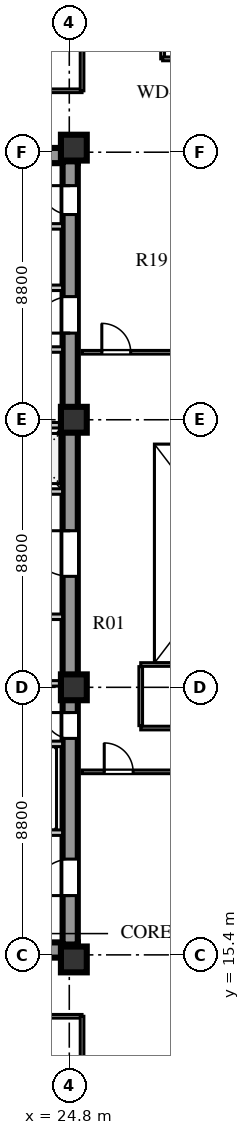
"""IFC4 building model, lengths in metres.
Left out: names, types, materials, properties, quantities, classifications, styles, units other than length and angle.
Written with IfcOpenShell. Run it as: python <this file> out.ifc"""

import sys

from ifc_helpers import new_model, si_unit, direction, frame, frame_2d, origin, origin_2d, place, context, subcontext, project, spatial, rectangle, extrude, element, fill, save


model = new_model("IFC4")
c1 = context("Model", 3, precision=1e-05, world=origin(), true_north=direction((0.0, 1.0)))
c2 = subcontext(c1, "Body", "Model", "MODEL_VIEW")
j1 = project(units=[si_unit("LENGTHUNIT", "METRE"), si_unit("PLANEANGLEUNIT", "RADIAN")], contexts=[c1])
p1 = place(None, origin())
s1 = spatial("IfcSite", under=j1, at=p1, CompositionType="ELEMENT")
p2 = place(p1, origin())
s2 = spatial("IfcBuilding", under=s1, at=p2, CompositionType="ELEMENT")
p3 = place(p2, frame((0.0, 0.0, 111.7)))
s3 = spatial("IfcBuildingStorey", under=s2, at=p3, CompositionType="ELEMENT", Elevation=111.7)
for number, where, z_axis, x_axis in (
    (1, (15.4, 15.56, 0.0), (0.0, 0.0, 1.0), (1.0, 0.0, 0.0)),
    (2, (15.4, 41.69, 0.0), (0.0, 0.0, 1.0), (1.0, 0.0, 0.0)),
):
    element("IfcWall", number, at=place(p3, frame(where, z_axis=z_axis, x_axis=x_axis)), inside=s3, PredefinedType="SHEAR", context=c2, shape_type="SweptSolid", body=[
        extrude(rectangle(XDim=9.68, YDim=0.5, at=frame_2d((4.84, 0.0))), origin(), (0.0, 0.0, 1.0), 3.6),
    ])
p4 = place(p3, frame((24.83, 15.74, 0.0), z_axis=(0.0, 0.0, 1.0), x_axis=(0.0, 1.0, 0.0)))
e3 = element("IfcWall", 3, at=p4, inside=s3, PredefinedType="SHEAR", context=c2, shape_type="SweptSolid", body=[
    extrude(rectangle(XDim=25.76, YDim=0.5, at=frame_2d((12.88, 0.0))), origin(), (0.0, 0.0, 1.0), 3.6),
])
p5 = place(p4, frame((1.61, 0.0, 0.0)))
e4 = element("IfcOpeningElement", 4, at=p5, cuts=e3, PredefinedType="OPENING", context=c2, shape_type="SweptSolid", body=[
    extrude(rectangle(XDim=1.2, YDim=2.1, at=frame_2d((0.6, 1.05))), frame((0.0, 0.26, 0.0), z_axis=(0.0, -1.0, 0.0), x_axis=(1.0, 0.0, 0.0)), (0.0, 0.0, 1.0), 0.52),
])
p6 = place(p4, frame((6.78, 0.0, 0.0)))
e5 = element("IfcOpeningElement", 5, at=p6, cuts=e3, PredefinedType="OPENING", context=c2, shape_type="SweptSolid", body=[
    extrude(rectangle(XDim=0.85, YDim=2.06, at=frame_2d((0.425, 1.03))), frame((0.0, 0.26, 0.0), z_axis=(0.0, -1.0, 0.0), x_axis=(1.0, 0.0, 0.0)), (0.0, 0.0, 1.0), 0.52),
])
p7 = place(p4, frame((12.11, 0.0, 0.0)))
e6 = element("IfcOpeningElement", 6, at=p7, cuts=e3, PredefinedType="OPENING", context=c2, shape_type="SweptSolid", body=[
    extrude(rectangle(XDim=1.5, YDim=2.12, at=frame_2d((0.75, 1.06))), frame((0.0, 0.26, 0.0), z_axis=(0.0, -1.0, 0.0), x_axis=(1.0, 0.0, 0.0)), (0.0, 0.0, 1.0), 0.52),
])
p8 = place(p4, frame((20.11, 0.0, 0.0)))
e7 = element("IfcOpeningElement", 7, at=p8, cuts=e3, PredefinedType="OPENING", context=c2, shape_type="SweptSolid", body=[
    extrude(rectangle(XDim=1.2, YDim=2.12, at=frame_2d((0.6, 1.06))), frame((0.0, 0.26, 0.0), z_axis=(0.0, -1.0, 0.0), x_axis=(1.0, 0.0, 0.0)), (0.0, 0.0, 1.0), 0.52),
])
p9 = place(p4, frame((24.01, 0.0, 0.0)))
e8 = element("IfcOpeningElement", 8, at=p9, cuts=e3, PredefinedType="OPENING", context=c2, shape_type="SweptSolid", body=[
    extrude(rectangle(XDim=0.95, YDim=2.1, at=frame_2d((0.475, 1.05))), frame((0.0, 0.26, 0.0), z_axis=(0.0, -1.0, 0.0), x_axis=(1.0, 0.0, 0.0)), (0.0, 0.0, 1.0), 0.52),
])
for number, where, z_axis, x_axis in (
    (9, (24.95, 15.25, 0.0), (0.0, 0.0, 1.0), (1.0, 0.0, 0.0)),
    (10, (24.95, 24.2, 0.0), (0.0, 0.0, 1.0), (1.0, 0.0, 0.0)),
    (11, (24.95, 33.0, 0.0), (0.0, 0.0, 1.0), (1.0, 0.0, 0.0)),
    (12, (24.95, 41.95, 0.0), (0.0, 0.0, 1.0), (1.0, 0.0, 0.0)),
):
    element("IfcColumn", number, at=place(p3, frame(where, z_axis=z_axis, x_axis=x_axis)), inside=s3, PredefinedType="COLUMN", context=c2, shape_type="SweptSolid", body=[
        extrude(rectangle(XDim=0.85, YDim=0.85, at=origin_2d()), origin(), (0.0, 0.0, 1.0), 3.6),
    ])
p10 = place(p3, frame((19.64, 19.42, 0.0), z_axis=(0.0, 0.0, 1.0), x_axis=(1.0, 0.0, 0.0)))
e13 = element("IfcWall", 13, at=p10, inside=s3, PredefinedType="SOLIDWALL", context=c2, shape_type="SweptSolid", body=[
    extrude(rectangle(XDim=4.94, YDim=0.18, at=frame_2d((2.47, 0.0))), origin(), (0.0, 0.0, 1.0), 3.6),
])
p11 = place(p10, frame((0.72, 0.0, 0.0)))
e14 = element("IfcOpeningElement", 14, at=p11, cuts=e13, PredefinedType="OPENING", context=c2, shape_type="SweptSolid", body=[
    extrude(rectangle(XDim=1.1, YDim=2.1, at=frame_2d((0.55, 1.05))), frame((0.0, 0.1, 0.0), z_axis=(0.0, -1.0, 0.0), x_axis=(1.0, 0.0, 0.0)), (0.0, 0.0, 1.0), 0.2),
])
p12 = place(p10, frame((3.02, 0.0, 0.0)))
e15 = element("IfcOpeningElement", 15, at=p12, cuts=e13, PredefinedType="OPENING", context=c2, shape_type="SweptSolid", body=[
    extrude(rectangle(XDim=1.1, YDim=2.1, at=frame_2d((0.55, 1.05))), frame((0.0, 0.1, 0.0), z_axis=(0.0, -1.0, 0.0), x_axis=(1.0, 0.0, 0.0)), (0.0, 0.0, 1.0), 0.2),
])
p13 = place(p3, frame((19.64, 22.34, 0.0), z_axis=(0.0, 0.0, 1.0), x_axis=(1.0, 0.0, 0.0)))
e16 = element("IfcWall", 16, at=p13, inside=s3, PredefinedType="SOLIDWALL", context=c2, shape_type="SweptSolid", body=[
    extrude(rectangle(XDim=4.94, YDim=0.18, at=frame_2d((2.47, 0.0))), origin(), (0.0, 0.0, 1.0), 3.6),
])
p14 = place(p3, frame((15.9, 26.52, 0.0), z_axis=(0.0, 0.0, 1.0), x_axis=(1.0, 0.0, 0.0)))
e17 = element("IfcWall", 17, at=p14, inside=s3, PredefinedType="SOLIDWALL", context=c2, shape_type="SweptSolid", body=[
    extrude(rectangle(XDim=8.68, YDim=0.18, at=frame_2d((4.34, 0.0))), origin(), (0.0, 0.0, 1.0), 3.6),
])
p15 = place(p14, frame((2.05, 0.0, 0.0)))
e18 = element("IfcOpeningElement", 18, at=p15, cuts=e17, PredefinedType="OPENING", context=c2, shape_type="SweptSolid", body=[
    extrude(rectangle(XDim=0.85, YDim=2.06, at=frame_2d((0.425, 1.03))), frame((0.0, 0.1, 0.0), z_axis=(0.0, -1.0, 0.0), x_axis=(1.0, 0.0, 0.0)), (0.0, 0.0, 1.0), 0.2),
])
p16 = place(p14, frame((5.2, 0.0, 0.0)))
e19 = element("IfcOpeningElement", 19, at=p16, cuts=e17, PredefinedType="OPENING", context=c2, shape_type="SweptSolid", body=[
    extrude(rectangle(XDim=0.95, YDim=2.1, at=frame_2d((0.475, 1.05))), frame((0.0, 0.1, 0.0), z_axis=(0.0, -1.0, 0.0), x_axis=(1.0, 0.0, 0.0)), (0.0, 0.0, 1.0), 0.2),
])
p17 = place(p3, frame((15.9, 24.33, 0.0), z_axis=(0.0, 0.0, 1.0), x_axis=(1.0, 0.0, 0.0)))
e20 = element("IfcWall", 20, at=p17, inside=s3, PredefinedType="SOLIDWALL", context=c2, shape_type="SweptSolid", body=[
    extrude(rectangle(XDim=8.68, YDim=0.18, at=frame_2d((4.34, 0.0))), origin(), (0.0, 0.0, 1.0), 2.95),
])
p18 = place(p3, frame((15.9, 30.64, 0.0), z_axis=(0.0, 0.0, 1.0), x_axis=(1.0, 0.0, 0.0)))
e21 = element("IfcWall", 21, at=p18, inside=s3, PredefinedType="SOLIDWALL", context=c2, shape_type="SweptSolid", body=[
    extrude(rectangle(XDim=8.68, YDim=0.18, at=frame_2d((4.34, 0.0))), origin(), (0.0, 0.0, 1.0), 3.6),
])
p19 = place(p18, frame((1.76, 0.0, 0.0)))
e22 = element("IfcOpeningElement", 22, at=p19, cuts=e21, PredefinedType="OPENING", context=c2, shape_type="SweptSolid", body=[
    extrude(rectangle(XDim=1.0, YDim=2.1, at=frame_2d((0.5, 1.05))), frame((0.0, 0.1, 0.0), z_axis=(0.0, -1.0, 0.0), x_axis=(1.0, 0.0, 0.0)), (0.0, 0.0, 1.0), 0.2),
])
p20 = place(p18, frame((3.6, 0.0, 0.0)))
e23 = element("IfcOpeningElement", 23, at=p20, cuts=e21, PredefinedType="OPENING", context=c2, shape_type="SweptSolid", body=[
    extrude(rectangle(XDim=1.0, YDim=2.1, at=frame_2d((0.5, 1.05))), frame((0.0, 0.1, 0.0), z_axis=(0.0, -1.0, 0.0), x_axis=(1.0, 0.0, 0.0)), (0.0, 0.0, 1.0), 0.2),
])
p21 = place(p18, frame((5.44, 0.0, 0.0)))
e24 = element("IfcOpeningElement", 24, at=p21, cuts=e21, PredefinedType="OPENING", context=c2, shape_type="SweptSolid", body=[
    extrude(rectangle(XDim=1.0, YDim=2.1, at=frame_2d((0.5, 1.05))), frame((0.0, 0.1, 0.0), z_axis=(0.0, -1.0, 0.0), x_axis=(1.0, 0.0, 0.0)), (0.0, 0.0, 1.0), 0.2),
])
p22 = place(p18, frame((7.28, 0.0, 0.0)))
e25 = element("IfcOpeningElement", 25, at=p22, cuts=e21, PredefinedType="OPENING", context=c2, shape_type="SweptSolid", body=[
    extrude(rectangle(XDim=1.0, YDim=2.1, at=frame_2d((0.5, 1.05))), frame((0.0, 0.1, 0.0), z_axis=(0.0, -1.0, 0.0), x_axis=(1.0, 0.0, 0.0)), (0.0, 0.0, 1.0), 0.2),
])
p23 = place(p3, frame((15.9, 32.82, 0.0), z_axis=(0.0, 0.0, 1.0), x_axis=(1.0, 0.0, 0.0)))
e26 = element("IfcWall", 26, at=p23, inside=s3, PredefinedType="SOLIDWALL", context=c2, shape_type="SweptSolid", body=[
    extrude(rectangle(XDim=8.68, YDim=0.18, at=frame_2d((4.34, 0.0))), origin(), (0.0, 0.0, 1.0), 2.95),
])
p24 = place(p3, frame((22.02, 35.31, 0.0), z_axis=(0.0, 0.0, 1.0), x_axis=(1.0, 0.0, 0.0)))
e27 = element("IfcWall", 27, at=p24, inside=s3, PredefinedType="SOLIDWALL", context=c2, shape_type="SweptSolid", body=[
    extrude(rectangle(XDim=2.56, YDim=0.18, at=frame_2d((1.28, 0.0))), origin(), (0.0, 0.0, 1.0), 3.6),
])
p25 = place(p24, frame((0.55, 0.0, 0.0)))
e28 = element("IfcOpeningElement", 28, at=p25, cuts=e27, PredefinedType="OPENING", context=c2, shape_type="SweptSolid", body=[
    extrude(rectangle(XDim=1.0, YDim=2.1, at=frame_2d((0.5, 1.05))), frame((0.0, 0.1, 0.0), z_axis=(0.0, -1.0, 0.0), x_axis=(1.0, 0.0, 0.0)), (0.0, 0.0, 1.0), 0.2),
])
p26 = place(p3, frame((19.64, 37.34, 0.0), z_axis=(0.0, 0.0, 1.0), x_axis=(1.0, 0.0, 0.0)))
e29 = element("IfcWall", 29, at=p26, inside=s3, PredefinedType="SOLIDWALL", context=c2, shape_type="SweptSolid", body=[
    extrude(rectangle(XDim=4.94, YDim=0.18, at=frame_2d((2.47, 0.0))), origin(), (0.0, 0.0, 1.0), 3.6),
])
p27 = place(p26, frame((0.45, 0.0, 0.0)))
e30 = element("IfcOpeningElement", 30, at=p27, cuts=e29, PredefinedType="OPENING", context=c2, shape_type="SweptSolid", body=[
    extrude(rectangle(XDim=1.0, YDim=2.1, at=frame_2d((0.5, 1.05))), frame((0.0, 0.1, 0.0), z_axis=(0.0, -1.0, 0.0), x_axis=(1.0, 0.0, 0.0)), (0.0, 0.0, 1.0), 0.2),
])
p28 = place(p26, frame((2.5, 0.0, 0.0)))
e31 = element("IfcOpeningElement", 31, at=p28, cuts=e29, PredefinedType="OPENING", context=c2, shape_type="SweptSolid", body=[
    extrude(rectangle(XDim=1.0, YDim=2.1, at=frame_2d((0.5, 1.05))), frame((0.0, 0.1, 0.0), z_axis=(0.0, -1.0, 0.0), x_axis=(1.0, 0.0, 0.0)), (0.0, 0.0, 1.0), 0.2),
])
p29 = place(p3, frame((19.64, 39.36, 0.0), z_axis=(0.0, 0.0, 1.0), x_axis=(1.0, 0.0, 0.0)))
e32 = element("IfcWall", 32, at=p29, inside=s3, PredefinedType="SOLIDWALL", context=c2, shape_type="SweptSolid", body=[
    extrude(rectangle(XDim=4.94, YDim=0.18, at=frame_2d((2.47, 0.0))), origin(), (0.0, 0.0, 1.0), 3.6),
])
p30 = place(p3, frame((25.22, 21.42, 0.0), z_axis=(0.0, 0.0, 1.0), x_axis=(1.0, 0.0, 0.0)))
e33 = element("IfcWall", 33, at=p30, inside=s3, PredefinedType="PARTITIONING", context=c2, shape_type="SweptSolid", body=[
    extrude(rectangle(XDim=15.6, YDim=0.12, at=frame_2d((7.8, 0.0))), origin(), (0.0, 0.0, 1.0), 3.2),
])
p31 = place(p30, frame((0.73, 0.0, 0.0)))
e34 = element("IfcOpeningElement", 34, at=p31, cuts=e33, PredefinedType="OPENING", context=c2, shape_type="SweptSolid", body=[
    extrude(rectangle(XDim=0.95, YDim=2.1, at=frame_2d((0.475, 1.05))), frame((0.0, 0.07, 0.0), z_axis=(0.0, -1.0, 0.0), x_axis=(1.0, 0.0, 0.0)), (0.0, 0.0, 1.0), 0.14),
])
p32 = place(p3, frame((27.15, 22.86, 0.0), z_axis=(0.0, 0.0, 1.0), x_axis=(1.0, 0.0, 0.0)))
e35 = element("IfcWall", 35, at=p32, inside=s3, PredefinedType="PARTITIONING", context=c2, shape_type="SweptSolid", body=[
    extrude(rectangle(XDim=13.67, YDim=0.12, at=frame_2d((6.835, 0.0))), origin(), (0.0, 0.0, 1.0), 3.6),
])
p33 = place(p32, frame((2.2, 0.0, 0.0)))
e36 = element("IfcOpeningElement", 36, at=p33, cuts=e35, PredefinedType="OPENING", context=c2, shape_type="SweptSolid", body=[
    extrude(rectangle(XDim=0.9, YDim=2.08, at=frame_2d((0.45, 1.04))), frame((0.0, 0.07, 0.0), z_axis=(0.0, -1.0, 0.0), x_axis=(1.0, 0.0, 0.0)), (0.0, 0.0, 1.0), 0.14),
])
p34 = place(p3, frame((25.22, 35.22, 0.0), z_axis=(0.0, 0.0, 1.0), x_axis=(1.0, 0.0, 0.0)))
e37 = element("IfcWall", 37, at=p34, inside=s3, PredefinedType="PARTITIONING", context=c2, shape_type="SweptSolid", body=[
    extrude(rectangle(XDim=9.5, YDim=0.12, at=frame_2d((4.75, 0.0))), origin(), (0.0, 0.0, 1.0), 3.6),
])
p35 = place(p34, frame((0.65, 0.0, 0.0)))
e38 = element("IfcOpeningElement", 38, at=p35, cuts=e37, PredefinedType="OPENING", context=c2, shape_type="SweptSolid", body=[
    extrude(rectangle(XDim=0.95, YDim=2.1, at=frame_2d((0.475, 1.05))), frame((0.0, 0.07, 0.0), z_axis=(0.0, -1.0, 0.0), x_axis=(1.0, 0.0, 0.0)), (0.0, 0.0, 1.0), 0.14),
])
p36 = place(p34, frame((5.4, 0.0, 0.0)))
e39 = element("IfcOpeningElement", 39, at=p36, cuts=e37, PredefinedType="OPENING", context=c2, shape_type="SweptSolid", body=[
    extrude(rectangle(XDim=1.05, YDim=2.1, at=frame_2d((0.525, 1.05))), frame((0.0, 0.07, 0.0), z_axis=(0.0, -1.0, 0.0), x_axis=(1.0, 0.0, 0.0)), (0.0, 0.0, 1.0), 0.14),
])
p37 = place(p3, frame((13.59, 13.38, 0.0), z_axis=(0.0, 0.0, 1.0), x_axis=(1.0, 0.0, 0.0)))
e40 = element("IfcWall", 40, at=p37, inside=s3, PredefinedType="PARTITIONING", context=c2, shape_type="SweptSolid", body=[
    extrude(rectangle(XDim=11.63, YDim=0.12, at=frame_2d((5.815, 0.0))), origin(), (0.0, 0.0, 1.0), 3.6),
])
p38 = place(p37, frame((4.56, 0.0, 0.0)))
e41 = element("IfcOpeningElement", 41, at=p38, cuts=e40, PredefinedType="OPENING", context=c2, shape_type="SweptSolid", body=[
    extrude(rectangle(XDim=1.0, YDim=2.08, at=frame_2d((0.5, 1.04))), frame((0.0, 0.07, 0.0), z_axis=(0.0, -1.0, 0.0), x_axis=(1.0, 0.0, 0.0)), (0.0, 0.0, 1.0), 0.14),
])
p39 = place(p3, frame((25.22, 10.28, 0.0), z_axis=(0.0, 0.0, 1.0), x_axis=(0.0, 1.0, 0.0)))
e42 = element("IfcWall", 42, at=p39, inside=s3, PredefinedType="PARTITIONING", context=c2, shape_type="SweptSolid", body=[
    extrude(rectangle(XDim=3.1, YDim=0.12, at=frame_2d((1.55, 0.0))), origin(), (0.0, 0.0, 1.0), 3.1),
])
p40 = place(p3, frame((13.59, 43.82, 0.0), z_axis=(0.0, 0.0, 1.0), x_axis=(1.0, 0.0, 0.0)))
e43 = element("IfcWall", 43, at=p40, inside=s3, PredefinedType="PARTITIONING", context=c2, shape_type="SweptSolid", body=[
    extrude(rectangle(XDim=11.63, YDim=0.12, at=frame_2d((5.815, 0.0))), origin(), (0.0, 0.0, 1.0), 3.6),
])
p41 = place(p40, frame((4.56, 0.0, 0.0)))
e44 = element("IfcOpeningElement", 44, at=p41, cuts=e43, PredefinedType="OPENING", context=c2, shape_type="SweptSolid", body=[
    extrude(rectangle(XDim=1.0, YDim=2.08, at=frame_2d((0.5, 1.04))), frame((0.0, 0.07, 0.0), z_axis=(0.0, -1.0, 0.0), x_axis=(1.0, 0.0, 0.0)), (0.0, 0.0, 1.0), 0.14),
])
p42 = place(p3, frame((25.22, 43.82, 0.0), z_axis=(0.0, 0.0, 1.0), x_axis=(0.0, 1.0, 0.0)))
e45 = element("IfcWall", 45, at=p42, inside=s3, PredefinedType="PARTITIONING", context=c2, shape_type="SweptSolid", body=[
    extrude(rectangle(XDim=3.1, YDim=0.12, at=frame_2d((1.55, 0.0))), origin(), (0.0, 0.0, 1.0), 3.1),
])
p43 = place(p3, frame((27.15, 24.95, 0.0), z_axis=(0.0, 0.0, 1.0), x_axis=(1.0, 0.0, 0.0)))
e46 = element("IfcWall", 46, at=p43, inside=s3, PredefinedType="PARTITIONING", context=c2, shape_type="SweptSolid", body=[
    extrude(rectangle(XDim=9.67, YDim=0.12, at=frame_2d((4.835, 0.0))), origin(), (0.0, 0.0, 1.0), 3.05),
])
p44 = place(p3, frame((27.15, 22.94, 0.0), z_axis=(0.0, 0.0, 1.0), x_axis=(0.0, 1.0, 0.0)))
e47 = element("IfcWall", 47, at=p44, inside=s3, PredefinedType="PARTITIONING", context=c2, shape_type="SweptSolid", body=[
    extrude(rectangle(XDim=1.94, YDim=0.12, at=frame_2d((0.97, 0.0))), origin(), (0.0, 0.0, 1.0), 3.6),
])
p45 = place(p3, frame((27.87, 44.87, 0.0), z_axis=(0.0, 0.0, 1.0), x_axis=(0.0, 1.0, 0.0)))
e48 = element("IfcWall", 48, at=p45, inside=s3, PredefinedType="PLUMBINGWALL", context=c2, shape_type="SweptSolid", body=[
    extrude(rectangle(XDim=2.05, YDim=0.125, at=frame_2d((1.025, 0.0))), origin(), (0.0, 0.0, 1.0), 3.6),
])
p46 = place(p3, frame((27.87, 44.87, 0.0), z_axis=(0.0, 0.0, 1.0), x_axis=(1.0, 0.0, 0.0)))
e49 = element("IfcWall", 49, at=p46, inside=s3, PredefinedType="PLUMBINGWALL", context=c2, shape_type="SweptSolid", body=[
    extrude(rectangle(XDim=2.05, YDim=0.125, at=frame_2d((1.025, 0.0))), origin(), (0.0, 0.0, 1.0), 3.6),
])
p47 = place(p46, frame((0.55, 0.0, 0.0)))
e50 = element("IfcOpeningElement", 50, at=p47, cuts=e49, PredefinedType="OPENING", context=c2, shape_type="SweptSolid", body=[
    extrude(rectangle(XDim=0.8, YDim=2.05, at=frame_2d((0.4, 1.025))), frame((0.0, 0.073, 0.0), z_axis=(0.0, -1.0, 0.0), x_axis=(1.0, 0.0, 0.0)), (0.0, 0.0, 1.0), 0.145),
])
p48 = place(p5, frame((1.2, 0.0, 0.0), z_axis=(0.0, 0.0, 1.0), x_axis=(-1.0, 0.0, 0.0)))
e51 = element("IfcDoor", 51, at=p48, inside=s3, OperationType="SINGLE_SWING_RIGHT", PredefinedType="DOOR", context=c2, shape_type="SweptSolid", body=[
    extrude(rectangle(XDim=1.2, YDim=2.1, at=frame_2d((0.6, 1.05))), frame((0.0, 0.025, 0.0), z_axis=(0.0, -1.0, 0.0), x_axis=(1.0, 0.0, 0.0)), (0.0, 0.0, 1.0), 0.05),
])
fill(e4, e51)
p49 = place(p6, frame((0.85, 0.0, 0.0), z_axis=(0.0, 0.0, 1.0), x_axis=(-1.0, 0.0, 0.0)))
e52 = element("IfcDoor", 52, at=p49, inside=s3, OperationType="SINGLE_SWING_LEFT", PredefinedType="DOOR", context=c2, shape_type="SweptSolid", body=[
    extrude(rectangle(XDim=0.85, YDim=2.06, at=frame_2d((0.425, 1.03))), frame((0.0, 0.025, 0.0), z_axis=(0.0, -1.0, 0.0), x_axis=(1.0, 0.0, 0.0)), (0.0, 0.0, 1.0), 0.05),
])
fill(e5, e52)
p50 = place(p7, frame((1.5, 0.0, 0.0), z_axis=(0.0, 0.0, 1.0), x_axis=(-1.0, 0.0, 0.0)))
e53 = element("IfcDoor", 53, at=p50, inside=s3, OperationType="SINGLE_SWING_LEFT", PredefinedType="DOOR", context=c2, shape_type="SweptSolid", body=[
    extrude(rectangle(XDim=1.5, YDim=2.12, at=frame_2d((0.75, 1.06))), frame((0.0, 0.025, 0.0), z_axis=(0.0, -1.0, 0.0), x_axis=(1.0, 0.0, 0.0)), (0.0, 0.0, 1.0), 0.05),
])
fill(e6, e53)
p51 = place(p8, frame((1.2, 0.0, 0.0), z_axis=(0.0, 0.0, 1.0), x_axis=(-1.0, 0.0, 0.0)))
e54 = element("IfcDoor", 54, at=p51, inside=s3, OperationType="SINGLE_SWING_RIGHT", PredefinedType="DOOR", context=c2, shape_type="SweptSolid", body=[
    extrude(rectangle(XDim=1.2, YDim=2.12, at=frame_2d((0.6, 1.06))), frame((0.0, 0.025, 0.0), z_axis=(0.0, -1.0, 0.0), x_axis=(1.0, 0.0, 0.0)), (0.0, 0.0, 1.0), 0.05),
])
fill(e7, e54)
p52 = place(p9, frame((0.95, 0.0, 0.0), z_axis=(0.0, 0.0, 1.0), x_axis=(-1.0, 0.0, 0.0)))
e55 = element("IfcDoor", 55, at=p52, inside=s3, OperationType="SINGLE_SWING_LEFT", PredefinedType="DOOR", context=c2, shape_type="SweptSolid", body=[
    extrude(rectangle(XDim=0.95, YDim=2.1, at=frame_2d((0.475, 1.05))), frame((0.0, 0.025, 0.0), z_axis=(0.0, -1.0, 0.0), x_axis=(1.0, 0.0, 0.0)), (0.0, 0.0, 1.0), 0.05),
])
fill(e8, e55)
p53 = place(p31, frame((0.95, 0.0, 0.0), z_axis=(0.0, 0.0, 1.0), x_axis=(-1.0, 0.0, 0.0)))
e56 = element("IfcDoor", 56, at=p53, inside=s3, OperationType="SINGLE_SWING_RIGHT", PredefinedType="DOOR", context=c2, shape_type="SweptSolid", body=[
    extrude(rectangle(XDim=0.95, YDim=2.1, at=frame_2d((0.475, 1.05))), frame((0.0, 0.025, 0.0), z_axis=(0.0, -1.0, 0.0), x_axis=(1.0, 0.0, 0.0)), (0.0, 0.0, 1.0), 0.05),
])
fill(e34, e56)
p54 = place(p35, origin())
e57 = element("IfcDoor", 57, at=p54, inside=s3, OperationType="SINGLE_SWING_LEFT", PredefinedType="DOOR", context=c2, shape_type="SweptSolid", body=[
    extrude(rectangle(XDim=0.95, YDim=2.1, at=frame_2d((0.475, 1.05))), frame((0.0, 0.025, 0.0), z_axis=(0.0, -1.0, 0.0), x_axis=(1.0, 0.0, 0.0)), (0.0, 0.0, 1.0), 0.05),
])
fill(e38, e57)
save(model, sys.argv[1])
